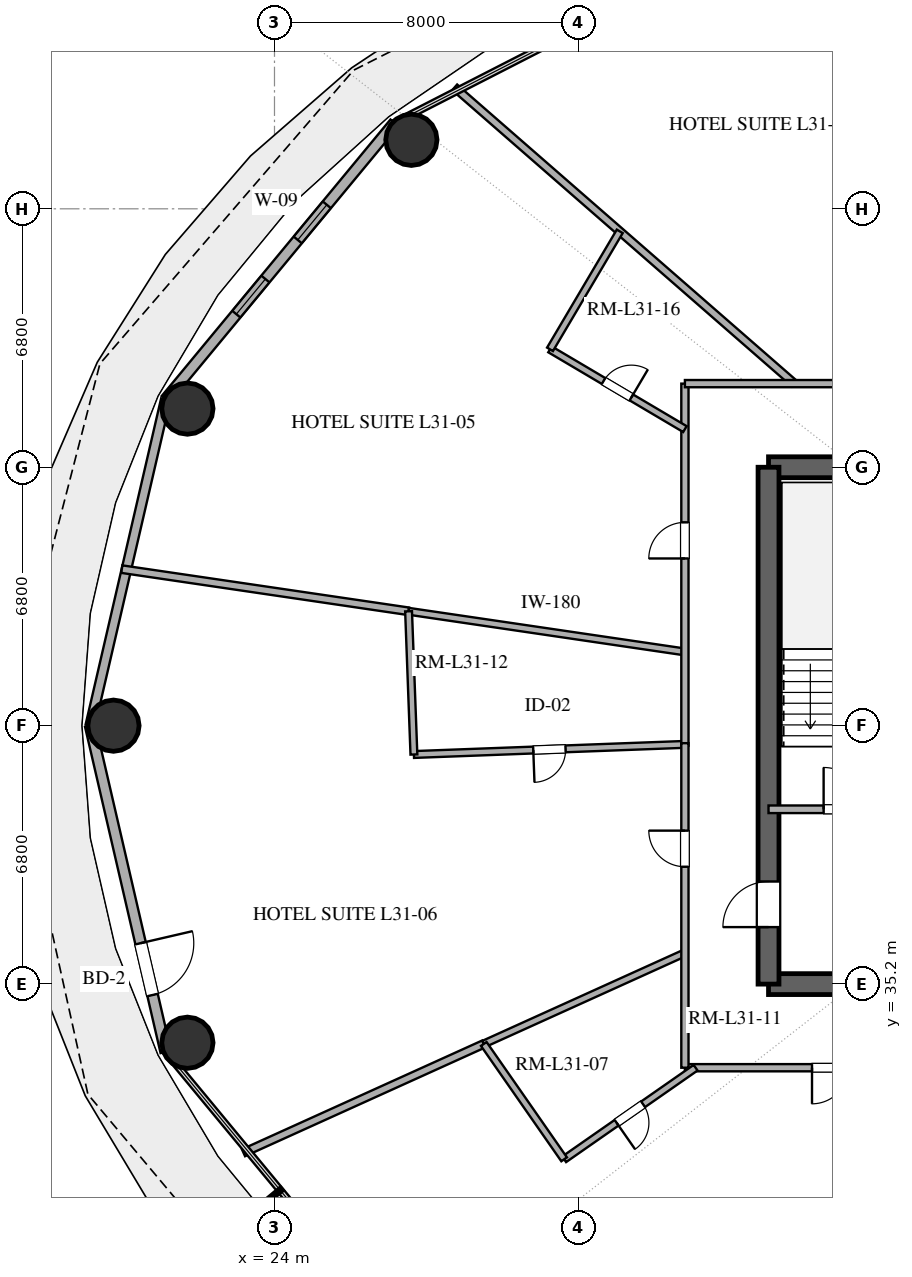
"""IFC4 building model, lengths in metres.
Left out: names, types, materials, properties, quantities, classifications, styles, units other than length and angle.
Written with IfcOpenShell. Run it as: python <this file> out.ifc"""

import sys

from ifc_helpers import new_model, si_unit, direction, frame, frame_2d, origin, origin_2d, place, context, subcontext, project, spatial, rectangle, hollow_circle, extrude, element, fill, save


model = new_model("IFC4")
c1 = context("Model", 3, precision=1e-05, world=origin(), true_north=direction((0.0, 1.0)))
c2 = subcontext(c1, "Body", "Model", "MODEL_VIEW")
j1 = project(units=[si_unit("LENGTHUNIT", "METRE"), si_unit("PLANEANGLEUNIT", "RADIAN")], contexts=[c1])
p1 = place(None, origin())
s1 = spatial("IfcSite", under=j1, at=p1, CompositionType="ELEMENT")
p2 = place(p1, origin())
s2 = spatial("IfcBuilding", under=s1, at=p2, CompositionType="ELEMENT")
p3 = place(p2, frame((0.0, 0.0, 123.6)))
s3 = spatial("IfcBuildingStorey", under=s2, at=p3, CompositionType="ELEMENT", Elevation=123.6)
for number, where, z_axis, x_axis in (
    (1, (37.0, 35.2, 0.0), (0.0, 0.0, 1.0), (1.0, 0.0, 0.0)),
    (2, (37.0, 48.8, 0.0), (0.0, 0.0, 1.0), (1.0, 0.0, 0.0)),
):
    element("IfcWall", number, at=place(p3, frame(where, z_axis=z_axis, x_axis=x_axis)), inside=s3, PredefinedType="SHEAR", context=c2, shape_type="SweptSolid", body=[
        extrude(rectangle(XDim=4.0, YDim=0.55, at=frame_2d((2.0, 0.0))), origin(), (0.0, 0.0, 1.0), 3.38),
    ])
p4 = place(p3, frame((37.0, 35.2, 0.0), z_axis=(0.0, 0.0, 1.0), x_axis=(0.0, 1.0, 0.0)))
e3 = element("IfcWall", 3, at=p4, inside=s3, PredefinedType="SHEAR", context=c2, shape_type="SweptSolid", body=[
    extrude(rectangle(XDim=13.6, YDim=0.55, at=frame_2d((6.8, 0.0))), origin(), (0.0, 0.0, 1.0), 3.38),
])
p5 = place(p4, frame((1.5, 0.0, 0.0)))
e4 = element("IfcOpeningElement", 4, at=p5, cuts=e3, PredefinedType="OPENING", context=c2, shape_type="SweptSolid", body=[
    extrude(rectangle(XDim=1.2, YDim=2.15, at=frame_2d((0.6, 1.075))), frame((0.0, 0.285, 0.0), z_axis=(0.0, -1.0, 0.0), x_axis=(1.0, 0.0, 0.0)), (0.0, 0.0, 1.0), 0.57),
])
for number, where, z_axis, x_axis in (
    (5, (27.602, 57.415, 0.0), (0.0, 0.0, 1.0), (1.0, 0.0, 0.0)),
    (6, (21.709, 50.343, 0.0), (0.0, 0.0, 1.0), (1.0, 0.0, 0.0)),
    (7, (19.763, 42.0, 0.0), (0.0, 0.0, 1.0), (1.0, 0.0, 0.0)),
    (8, (21.709, 33.657, 0.0), (0.0, 0.0, 1.0), (1.0, 0.0, 0.0)),
):
    element("IfcColumn", number, at=place(p3, frame(where, z_axis=z_axis, x_axis=x_axis)), inside=s3, PredefinedType="COLUMN", context=c2, shape_type="SweptSolid", body=[
        extrude(hollow_circle(Radius=0.675, WallThickness=0.036, at=origin_2d()), origin(), (0.0, 0.0, 1.0), 3.38),
    ])
p6 = place(p3, frame((27.16, 57.86, 0.0), z_axis=(0.0, 0.0, 1.0), x_axis=(-0.637505817448, -0.770445541696, 0.0)))
e9 = element("IfcWall", 9, at=p6, inside=s3, PredefinedType="SOLIDWALL", context=c2, shape_type="SweptSolid", body=[
    extrude(rectangle(XDim=9.445, YDim=0.28, at=frame_2d((4.723, 0.0))), origin(), (0.0, 0.0, 1.0), 3.38),
])
p7 = place(p6, frame((2.797, 0.0, 0.85)))
e10 = element("IfcOpeningElement", 10, at=p7, cuts=e9, PredefinedType="OPENING", context=c2, shape_type="SweptSolid", body=[
    extrude(rectangle(XDim=1.2, YDim=1.8, at=frame_2d((0.6, 0.9))), frame((0.0, 0.15, 0.0), z_axis=(0.0, -1.0, 0.0), x_axis=(1.0, 0.0, 0.0)), (0.0, 0.0, 1.0), 0.3),
])
p8 = place(p6, frame((5.332, 0.0, 0.85)))
e11 = element("IfcOpeningElement", 11, at=p8, cuts=e9, PredefinedType="OPENING", context=c2, shape_type="SweptSolid", body=[
    extrude(rectangle(XDim=1.2, YDim=1.8, at=frame_2d((0.6, 0.9))), frame((0.0, 0.15, 0.0), z_axis=(0.0, -1.0, 0.0), x_axis=(1.0, 0.0, 0.0)), (0.0, 0.0, 1.0), 0.3),
])
p9 = place(p3, frame((21.139, 50.583, 0.0), z_axis=(0.0, 0.0, 1.0), x_axis=(-0.22558597182, -0.974223264616, 0.0)))
e12 = element("IfcWall", 12, at=p9, inside=s3, PredefinedType="SOLIDWALL", context=c2, shape_type="SweptSolid", body=[
    extrude(rectangle(XDim=8.811, YDim=0.25, at=frame_2d((4.405, 0.0))), origin(), (0.0, 0.0, 1.0), 3.38),
])
p10 = place(p3, frame((19.151, 42.0, 0.0), z_axis=(0.0, 0.0, 1.0), x_axis=(0.22558597182, -0.974223264616, 0.0)))
e13 = element("IfcWall", 13, at=p10, inside=s3, PredefinedType="SOLIDWALL", context=c2, shape_type="SweptSolid", body=[
    extrude(rectangle(XDim=8.811, YDim=0.28, at=frame_2d((4.405, 0.0))), origin(), (0.0, 0.0, 1.0), 3.38),
])
p11 = place(p10, frame((5.875, 0.0, 0.0)))
e14 = element("IfcOpeningElement", 14, at=p11, cuts=e13, PredefinedType="OPENING", context=c2, shape_type="SweptSolid", body=[
    extrude(rectangle(XDim=1.4, YDim=2.2, at=frame_2d((0.7, 1.1))), frame((0.0, 0.15, 0.0), z_axis=(0.0, -1.0, 0.0), x_axis=(1.0, 0.0, 0.0)), (0.0, 0.0, 1.0), 0.3),
])
p12 = place(p3, frame((37.0, 39.8, 0.0), z_axis=(0.0, 0.0, 1.0), x_axis=(1.0, 0.0, 0.0)))
e15 = element("IfcWall", 15, at=p12, inside=s3, PredefinedType="SOLIDWALL", context=c2, shape_type="SweptSolid", body=[
    extrude(rectangle(XDim=4.0, YDim=0.2, at=frame_2d((2.0, 0.0))), origin(), (0.0, 0.0, 1.0), 2.74),
])
p13 = place(p12, frame((1.45, 0.0, 0.0)))
e16 = element("IfcOpeningElement", 16, at=p13, cuts=e15, PredefinedType="OPENING", context=c2, shape_type="SweptSolid", body=[
    extrude(rectangle(XDim=1.1, YDim=2.15, at=frame_2d((0.55, 1.075))), frame((0.0, 0.11, 0.0), z_axis=(0.0, -1.0, 0.0), x_axis=(1.0, 0.0, 0.0)), (0.0, 0.0, 1.0), 0.22),
])
p14 = place(p3, frame((35.037, 21.969, 0.0), z_axis=(0.0, 0.0, 1.0), x_axis=(0.543298274368, 0.839539745973, 0.0)))
e17 = element("IfcWall", 17, at=p14, inside=s3, PredefinedType="PARTITIONING", context=c2, shape_type="SweptSolid", body=[
    extrude(rectangle(XDim=13.139, YDim=0.2, at=frame_2d((6.57, 0.0))), origin(), (0.0, 0.0, 1.0), 2.74),
])
p15 = place(p3, frame((19.982, 46.119, 0.0), z_axis=(0.0, 0.0, 1.0), x_axis=(0.989365774641, -0.14544883626, 0.0)))
e18 = element("IfcWall", 18, at=p15, inside=s3, PredefinedType="PARTITIONING", context=c2, shape_type="SweptSolid", body=[
    extrude(rectangle(XDim=7.627, YDim=0.2, at=frame_2d((3.813, 0.0))), origin(), (0.0, 0.0, 1.0), 2.74),
])
p16 = place(p3, frame((27.528, 45.01, 0.0), z_axis=(0.0, 0.0, 1.0), x_axis=(0.989364619243, -0.145456695238, 0.0)))
e19 = element("IfcWall", 19, at=p16, inside=s3, PredefinedType="PLUMBINGWALL", context=c2, shape_type="SweptSolid", body=[
    extrude(rectangle(XDim=7.35, YDim=0.18, at=frame_2d((3.675, 0.0))), origin(), (0.0, 0.0, 1.0), 2.74),
])
p17 = place(p3, frame((49.671, 33.0, 0.0), z_axis=(0.0, 0.0, 1.0), x_axis=(-1.0, 0.0, 0.0)))
e20 = element("IfcWall", 20, at=p17, inside=s3, PredefinedType="PARTITIONING", context=c2, shape_type="SweptSolid", body=[
    extrude(rectangle(XDim=14.871, YDim=0.19, at=frame_2d((7.436, 0.0))), origin(), (0.0, 0.0, 1.0), 2.74),
])
p18 = place(p17, frame((10.576, 0.0, 0.0)))
e21 = element("IfcOpeningElement", 21, at=p18, cuts=e20, PredefinedType="OPENING", context=c2, shape_type="SweptSolid", body=[
    extrude(rectangle(XDim=0.95, YDim=2.15, at=frame_2d((0.475, 1.075))), frame((0.0, 0.105, 0.0), z_axis=(0.0, -1.0, 0.0), x_axis=(1.0, 0.0, 0.0)), (0.0, 0.0, 1.0), 0.21),
])
p19 = place(p17, frame((4.101, 0.0, 0.0)))
e22 = element("IfcOpeningElement", 22, at=p19, cuts=e20, PredefinedType="OPENING", context=c2, shape_type="SweptSolid", body=[
    extrude(rectangle(XDim=1.0, YDim=2.2, at=frame_2d((0.5, 1.1))), frame((0.0, 0.105, 0.0), z_axis=(0.0, -1.0, 0.0), x_axis=(1.0, 0.0, 0.0)), (0.0, 0.0, 1.0), 0.21),
])
p20 = place(p3, frame((34.8, 41.508, 0.0), z_axis=(0.0, 0.0, 1.0), x_axis=(-0.999305711591, -0.037257144028, 0.0)))
e23 = element("IfcWall", 23, at=p20, inside=s3, PredefinedType="PLUMBINGWALL", context=c2, shape_type="SweptSolid", body=[
    extrude(rectangle(XDim=7.136, YDim=0.18, at=frame_2d((3.568, 0.0))), origin(), (0.0, 0.0, 1.0), 2.74),
])
p21 = place(p20, frame((3.143, 0.0, 0.0)))
e24 = element("IfcOpeningElement", 24, at=p21, cuts=e23, PredefinedType="OPENING", context=c2, shape_type="SweptSolid", body=[
    extrude(rectangle(XDim=0.85, YDim=2.1, at=frame_2d((0.425, 1.05))), frame((0.0, 0.1, 0.0), z_axis=(0.0, -1.0, 0.0), x_axis=(1.0, 0.0, 0.0)), (0.0, 0.0, 1.0), 0.2),
])
p22 = place(p3, frame((23.185, 30.762, 0.0), z_axis=(0.0, 0.0, 1.0), x_axis=(0.910940213411, 0.412538395292, 0.0)))
e25 = element("IfcWall", 25, at=p22, inside=s3, PredefinedType="PARTITIONING", context=c2, shape_type="SweptSolid", body=[
    extrude(rectangle(XDim=6.941, YDim=0.2, at=frame_2d((3.47, 0.0))), origin(), (0.0, 0.0, 1.0), 2.74),
])
p23 = place(p3, frame((37.68, 51.0, 0.0), z_axis=(0.0, 0.0, 1.0), x_axis=(-0.753659518717, 0.657265037749, 0.0)))
e26 = element("IfcWall", 26, at=p23, inside=s3, PredefinedType="PARTITIONING", context=c2, shape_type="SweptSolid", body=[
    extrude(rectangle(XDim=11.861, YDim=0.2, at=frame_2d((5.93, 0.0))), origin(), (0.0, 0.0, 1.0), 2.74),
])
p24 = place(p3, frame((34.8, 41.476, 0.0), z_axis=(0.0, 0.0, 1.0), x_axis=(0.0, 1.0, 0.0)))
e27 = element("IfcWall", 27, at=p24, inside=s3, PredefinedType="PARTITIONING", context=c2, shape_type="SweptSolid", body=[
    extrude(rectangle(XDim=9.524, YDim=0.19, at=frame_2d((4.762, 0.0))), origin(), (0.0, 0.0, 1.0), 2.74),
])
p25 = place(p24, frame((4.924, 0.0, 0.0)))
e28 = element("IfcOpeningElement", 28, at=p25, cuts=e27, PredefinedType="OPENING", context=c2, shape_type="SweptSolid", body=[
    extrude(rectangle(XDim=0.95, YDim=2.15, at=frame_2d((0.475, 1.075))), frame((0.0, 0.105, 0.0), z_axis=(0.0, -1.0, 0.0), x_axis=(1.0, 0.0, 0.0)), (0.0, 0.0, 1.0), 0.21),
])
p26 = place(p3, frame((34.8, 51.0, 0.0), z_axis=(0.0, 0.0, 1.0), x_axis=(1.0, 0.0, 0.0)))
e29 = element("IfcWall", 29, at=p26, inside=s3, PredefinedType="PARTITIONING", context=c2, shape_type="SweptSolid", body=[
    extrude(rectangle(XDim=10.622, YDim=0.19, at=frame_2d((5.311, 0.0))), origin(), (0.0, 0.0, 1.0), 2.74),
])
p27 = place(p26, frame((5.297, 0.0, 0.0)))
e30 = element("IfcOpeningElement", 30, at=p27, cuts=e29, PredefinedType="OPENING", context=c2, shape_type="SweptSolid", body=[
    extrude(rectangle(XDim=0.95, YDim=2.15, at=frame_2d((0.475, 1.075))), frame((0.0, 0.105, 0.0), z_axis=(0.0, -1.0, 0.0), x_axis=(1.0, 0.0, 0.0)), (0.0, 0.0, 1.0), 0.21),
])
p28 = place(p3, frame((29.507, 33.625, 0.0), z_axis=(0.0, 0.0, 1.0), x_axis=(0.910959840523, 0.412495053248, 0.0)))
e31 = element("IfcWall", 31, at=p28, inside=s3, PredefinedType="PLUMBINGWALL", context=c2, shape_type="SweptSolid", body=[
    extrude(rectangle(XDim=5.81, YDim=0.18, at=frame_2d((2.905, 0.0))), origin(), (0.0, 0.0, 1.0), 2.74),
])
p29 = place(p3, frame((34.8, 33.0, 0.0), z_axis=(0.0, 0.0, 1.0), x_axis=(0.0, 1.0, 0.0)))
e32 = element("IfcWall", 32, at=p29, inside=s3, PredefinedType="PARTITIONING", context=c2, shape_type="SweptSolid", body=[
    extrude(rectangle(XDim=8.54, YDim=0.19, at=frame_2d((4.27, 0.0))), origin(), (0.0, 0.0, 1.0), 2.74),
])
p30 = place(p29, frame((5.288, 0.0, 0.0)))
e33 = element("IfcOpeningElement", 33, at=p30, cuts=e32, PredefinedType="OPENING", context=c2, shape_type="SweptSolid", body=[
    extrude(rectangle(XDim=0.95, YDim=2.15, at=frame_2d((0.475, 1.075))), frame((0.0, 0.105, 0.0), z_axis=(0.0, -1.0, 0.0), x_axis=(1.0, 0.0, 0.0)), (0.0, 0.0, 1.0), 0.21),
])
p31 = place(p3, frame((35.081, 33.0, 0.0), z_axis=(0.0, 0.0, 1.0), x_axis=(-0.820508449427, -0.571634397512, 0.0)))
e34 = element("IfcWall", 34, at=p31, inside=s3, PredefinedType="PLUMBINGWALL", context=c2, shape_type="SweptSolid", body=[
    extrude(rectangle(XDim=4.216, YDim=0.18, at=frame_2d((2.108, 0.0))), origin(), (0.0, 0.0, 1.0), 2.74),
])
p32 = place(p31, frame((1.683, 0.0, 0.0)))
e35 = element("IfcOpeningElement", 35, at=p32, cuts=e34, PredefinedType="OPENING", context=c2, shape_type="SweptSolid", body=[
    extrude(rectangle(XDim=0.85, YDim=2.1, at=frame_2d((0.425, 1.05))), frame((0.0, 0.1, 0.0), z_axis=(0.0, -1.0, 0.0), x_axis=(1.0, 0.0, 0.0)), (0.0, 0.0, 1.0), 0.2),
])
p33 = place(p3, frame((31.25, 51.902, 0.0), z_axis=(0.0, 0.0, 1.0), x_axis=(0.860833406846, -0.508886869214, 0.0)))
e36 = element("IfcWall", 36, at=p33, inside=s3, PredefinedType="PLUMBINGWALL", context=c2, shape_type="SweptSolid", body=[
    extrude(rectangle(XDim=4.124, YDim=0.18, at=frame_2d((2.062, 0.0))), origin(), (0.0, 0.0, 1.0), 2.74),
])
p34 = place(p33, frame((1.637, 0.0, 0.0)))
e37 = element("IfcOpeningElement", 37, at=p34, cuts=e36, PredefinedType="OPENING", context=c2, shape_type="SweptSolid", body=[
    extrude(rectangle(XDim=0.85, YDim=2.1, at=frame_2d((0.425, 1.05))), frame((0.0, 0.1, 0.0), z_axis=(0.0, -1.0, 0.0), x_axis=(1.0, 0.0, 0.0)), (0.0, 0.0, 1.0), 0.2),
])
p35 = place(p3, frame((27.669, 41.242, 0.0), z_axis=(0.0, 0.0, 1.0), x_axis=(-0.037294239527, 0.999304327869, 0.0)))
e38 = element("IfcWall", 38, at=p35, inside=s3, PredefinedType="PLUMBINGWALL", context=c2, shape_type="SweptSolid", body=[
    extrude(rectangle(XDim=3.771, YDim=0.18, at=frame_2d((1.885, 0.0))), origin(), (0.0, 0.0, 1.0), 2.74),
])
p36 = place(p3, frame((31.622, 30.59, 0.0), z_axis=(0.0, 0.0, 1.0), x_axis=(-0.571609603384, 0.820525722521, 0.0)))
e39 = element("IfcWall", 39, at=p36, inside=s3, PredefinedType="PLUMBINGWALL", context=c2, shape_type="SweptSolid", body=[
    extrude(rectangle(XDim=3.7, YDim=0.18, at=frame_2d((1.85, 0.0))), origin(), (0.0, 0.0, 1.0), 2.74),
])
p37 = place(p3, frame((33.085, 55.007, 0.0), z_axis=(0.0, 0.0, 1.0), x_axis=(-0.508909491775, -0.860820032981, 0.0)))
e40 = element("IfcWall", 40, at=p37, inside=s3, PredefinedType="PLUMBINGWALL", context=c2, shape_type="SweptSolid", body=[
    extrude(rectangle(XDim=3.606, YDim=0.18, at=frame_2d((1.803, 0.0))), origin(), (0.0, 0.0, 1.0), 2.74),
])
p38 = place(p7, origin())
e41 = element("IfcWindow", 41, at=p38, inside=s3, PartitioningType="SINGLE_PANEL", PredefinedType="WINDOW", context=c2, shape_type="SweptSolid", body=[
    extrude(rectangle(XDim=1.2, YDim=1.8, at=frame_2d((0.6, 0.9))), frame((0.0, 0.03, 0.0), z_axis=(0.0, -1.0, 0.0), x_axis=(1.0, 0.0, 0.0)), (0.0, 0.0, 1.0), 0.06),
])
fill(e10, e41)
p39 = place(p8, origin())
e42 = element("IfcWindow", 42, at=p39, inside=s3, PartitioningType="SINGLE_PANEL", PredefinedType="WINDOW", context=c2, shape_type="SweptSolid", body=[
    extrude(rectangle(XDim=1.2, YDim=1.8, at=frame_2d((0.6, 0.9))), frame((0.0, 0.03, 0.0), z_axis=(0.0, -1.0, 0.0), x_axis=(1.0, 0.0, 0.0)), (0.0, 0.0, 1.0), 0.06),
])
fill(e11, e42)
p40 = place(p11, origin())
e43 = element("IfcDoor", 43, at=p40, inside=s3, OperationType="SINGLE_SWING_LEFT", PredefinedType="DOOR", context=c2, shape_type="SweptSolid", body=[
    extrude(rectangle(XDim=1.4, YDim=2.2, at=frame_2d((0.7, 1.1))), frame((0.0, 0.025, 0.0), z_axis=(0.0, -1.0, 0.0), x_axis=(1.0, 0.0, 0.0)), (0.0, 0.0, 1.0), 0.05),
])
fill(e14, e43)
p41 = place(p5, origin())
e44 = element("IfcDoor", 44, at=p41, inside=s3, OperationType="SINGLE_SWING_LEFT", PredefinedType="DOOR", context=c2, shape_type="SweptSolid", body=[
    extrude(rectangle(XDim=1.2, YDim=2.15, at=frame_2d((0.6, 1.075))), frame((0.0, 0.025, 0.0), z_axis=(0.0, -1.0, 0.0), x_axis=(1.0, 0.0, 0.0)), (0.0, 0.0, 1.0), 0.05),
])
fill(e4, e44)
p42 = place(p13, origin())
e45 = element("IfcDoor", 45, at=p42, inside=s3, OperationType="SINGLE_SWING_LEFT", PredefinedType="DOOR", context=c2, shape_type="SweptSolid", body=[
    extrude(rectangle(XDim=1.1, YDim=2.15, at=frame_2d((0.55, 1.075))), frame((0.0, 0.025, 0.0), z_axis=(0.0, -1.0, 0.0), x_axis=(1.0, 0.0, 0.0)), (0.0, 0.0, 1.0), 0.05),
])
fill(e16, e45)
p43 = place(p18, origin())
e46 = element("IfcDoor", 46, at=p43, inside=s3, OperationType="SINGLE_SWING_RIGHT", PredefinedType="DOOR", context=c2, shape_type="SweptSolid", body=[
    extrude(rectangle(XDim=0.95, YDim=2.15, at=frame_2d((0.475, 1.075))), frame((0.0, 0.025, 0.0), z_axis=(0.0, -1.0, 0.0), x_axis=(1.0, 0.0, 0.0)), (0.0, 0.0, 1.0), 0.05),
])
fill(e21, e46)
p44 = place(p21, origin())
e47 = element("IfcDoor", 47, at=p44, inside=s3, OperationType="SINGLE_SWING_RIGHT", PredefinedType="DOOR", context=c2, shape_type="SweptSolid", body=[
    extrude(rectangle(XDim=0.85, YDim=2.1, at=frame_2d((0.425, 1.05))), frame((0.0, 0.025, 0.0), z_axis=(0.0, -1.0, 0.0), x_axis=(1.0, 0.0, 0.0)), (0.0, 0.0, 1.0), 0.05),
])
fill(e24, e47)
p45 = place(p25, origin())
e48 = element("IfcDoor", 48, at=p45, inside=s3, OperationType="SINGLE_SWING_LEFT", PredefinedType="DOOR", context=c2, shape_type="SweptSolid", body=[
    extrude(rectangle(XDim=0.95, YDim=2.15, at=frame_2d((0.475, 1.075))), frame((0.0, 0.025, 0.0), z_axis=(0.0, -1.0, 0.0), x_axis=(1.0, 0.0, 0.0)), (0.0, 0.0, 1.0), 0.05),
])
fill(e28, e48)
p46 = place(p30, origin())
e49 = element("IfcDoor", 49, at=p46, inside=s3, OperationType="SINGLE_SWING_RIGHT", PredefinedType="DOOR", context=c2, shape_type="SweptSolid", body=[
    extrude(rectangle(XDim=0.95, YDim=2.15, at=frame_2d((0.475, 1.075))), frame((0.0, 0.025, 0.0), z_axis=(0.0, -1.0, 0.0), x_axis=(1.0, 0.0, 0.0)), (0.0, 0.0, 1.0), 0.05),
])
fill(e33, e49)
p47 = place(p32, origin())
e50 = element("IfcDoor", 50, at=p47, inside=s3, OperationType="SINGLE_SWING_RIGHT", PredefinedType="DOOR", context=c2, shape_type="SweptSolid", body=[
    extrude(rectangle(XDim=0.85, YDim=2.1, at=frame_2d((0.425, 1.05))), frame((0.0, 0.025, 0.0), z_axis=(0.0, -1.0, 0.0), x_axis=(1.0, 0.0, 0.0)), (0.0, 0.0, 1.0), 0.05),
])
fill(e35, e50)
p48 = place(p34, origin())
e51 = element("IfcDoor", 51, at=p48, inside=s3, OperationType="SINGLE_SWING_RIGHT", PredefinedType="DOOR", context=c2, shape_type="SweptSolid", body=[
    extrude(rectangle(XDim=0.85, YDim=2.1, at=frame_2d((0.425, 1.05))), frame((0.0, 0.025, 0.0), z_axis=(0.0, -1.0, 0.0), x_axis=(1.0, 0.0, 0.0)), (0.0, 0.0, 1.0), 0.05),
])
fill(e37, e51)
save(model, sys.argv[1])
